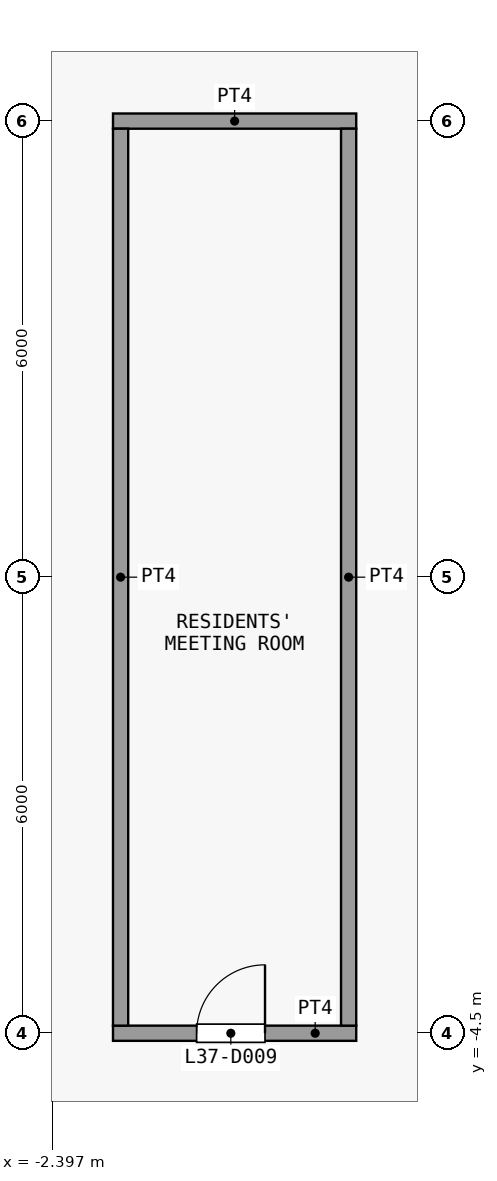
"""IFC4 building model, lengths in metres.
Left out: names, types, materials, properties, quantities, classifications, styles, units other than length and angle.
Written with IfcOpenShell. Run it as: python <this file> out.ifc"""

import sys

from ifc_helpers import new_model, si_unit, direction, frame, frame_2d, origin, place, context, subcontext, project, spatial, rectangle, extrude, element, fill, save


model = new_model("IFC4")
c1 = context("Model", 3, precision=1e-05, world=origin(), true_north=direction((0.0, 1.0)))
c2 = subcontext(c1, "Body", "Model", "MODEL_VIEW")
j1 = project(units=[si_unit("LENGTHUNIT", "METRE"), si_unit("PLANEANGLEUNIT", "RADIAN")], contexts=[c1])
p1 = place(None, origin())
s1 = spatial("IfcSite", under=j1, at=p1, CompositionType="ELEMENT")
p2 = place(p1, origin())
s2 = spatial("IfcBuilding", under=s1, at=p2, CompositionType="ELEMENT")
p3 = place(p2, frame((0.0, 0.0, 152.9)))
s3 = spatial("IfcBuildingStorey", under=s2, at=p3, CompositionType="ELEMENT", Elevation=152.9)
p4 = place(p3, frame((-1.6, -4.5, 0.0), z_axis=(0.0, 0.0, 1.0), x_axis=(1.0, 0.0, 0.0)))
e1 = element("IfcWall", 1, at=p4, inside=s3, PredefinedType="PARTITIONING", context=c2, shape_type="SweptSolid", body=[
    extrude(rectangle(XDim=3.2, YDim=0.2, at=frame_2d((1.6, 0.0))), origin(), (0.0, 0.0, 1.0), 3.3),
])
p5 = place(p4, frame((1.1, 0.0, 0.0)))
e2 = element("IfcOpeningElement", 2, at=p5, cuts=e1, PredefinedType="OPENING", context=c2, shape_type="SweptSolid", body=[
    extrude(rectangle(XDim=0.9, YDim=2.1, at=frame_2d((0.45, 1.05))), frame((0.0, 0.11, 0.0), z_axis=(0.0, -1.0, 0.0), x_axis=(1.0, 0.0, 0.0)), (0.0, 0.0, 1.0), 0.22),
])
p6 = place(p3, frame((-1.6, 7.5, 0.0), z_axis=(0.0, 0.0, 1.0), x_axis=(1.0, 0.0, 0.0)))
e3 = element("IfcWall", 3, at=p6, inside=s3, PredefinedType="PARTITIONING", context=c2, shape_type="SweptSolid", body=[
    extrude(rectangle(XDim=3.2, YDim=0.2, at=frame_2d((1.6, 0.0))), origin(), (0.0, 0.0, 1.0), 3.3),
])
for number, where, z_axis, x_axis in (
    (4, (-1.5, -4.4, 0.0), (0.0, 0.0, 1.0), (0.0, 1.0, 0.0)),
    (5, (1.5, -4.4, 0.0), (0.0, 0.0, 1.0), (0.0, 1.0, 0.0)),
):
    element("IfcWall", number, at=place(p3, frame(where, z_axis=z_axis, x_axis=x_axis)), inside=s3, PredefinedType="PARTITIONING", context=c2, shape_type="SweptSolid", body=[
        extrude(rectangle(XDim=11.8, YDim=0.2, at=frame_2d((5.9, 0.0))), origin(), (0.0, 0.0, 1.0), 3.3),
    ])
p7 = place(p5, origin())
e6 = element("IfcDoor", 6, at=p7, inside=s3, OperationType="SINGLE_SWING_LEFT", PredefinedType="DOOR", context=c2, shape_type="SweptSolid", body=[
    extrude(rectangle(XDim=0.9, YDim=2.1, at=frame_2d((0.45, 1.05))), frame((0.0, 0.025, 0.0), z_axis=(0.0, -1.0, 0.0), x_axis=(1.0, 0.0, 0.0)), (0.0, 0.0, 1.0), 0.05),
])
fill(e2, e6)
save(model, sys.argv[1])
